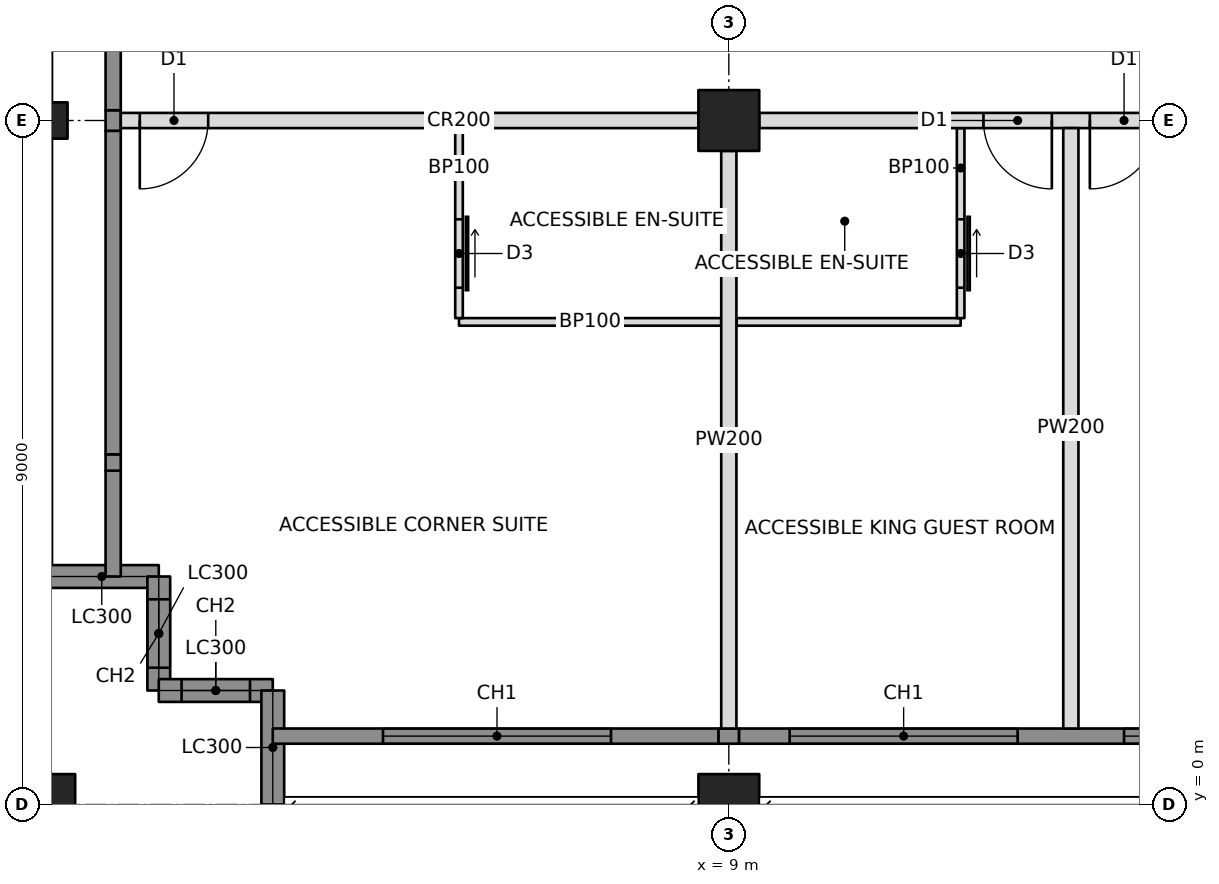
"""IFC4 building model, lengths in metres.
Left out: names, types, materials, properties, quantities, classifications, styles, units other than length and angle.
Written with IfcOpenShell. Run it as: python <this file> out.ifc"""

import sys

from ifc_helpers import new_model, si_unit, direction, frame, frame_2d, origin, origin_with_axes, origin_2d, place, context, subcontext, project, spatial, rectangle, hollow_rectangle, i_section, extrude, element, fill, save


model = new_model("IFC4")
c1 = context("Model", 3, precision=1e-05, world=origin(), true_north=direction((0.0, 1.0)))
c2 = subcontext(c1, "Body", "Model", "MODEL_VIEW")
j1 = project(units=[si_unit("LENGTHUNIT", "METRE"), si_unit("PLANEANGLEUNIT", "RADIAN")], contexts=[c1])
p1 = place(None, origin())
s1 = spatial("IfcSite", under=j1, at=p1, CompositionType="ELEMENT")
p2 = place(p1, origin())
s2 = spatial("IfcBuilding", under=s1, at=p2, CompositionType="ELEMENT")
p3 = place(p2, frame((0.0, 0.0, 51.8)))
s3 = spatial("IfcBuildingStorey", under=s2, at=p3, CompositionType="ELEMENT", Elevation=51.8)
p4 = place(p3, origin_with_axes())
e1 = element("IfcColumn", 1, at=p4, inside=s3, PredefinedType="COLUMN", context=c2, shape_type="SweptSolid", body=[
    extrude(hollow_rectangle(XDim=0.8, YDim=0.8, WallThickness=0.1, at=origin_2d()), origin(), (0.0, 0.0, 1.0), 3.4),
])
p5 = place(p3, frame((0.0, 9.0, 0.0), z_axis=(0.0, 0.0, 1.0), x_axis=(0.0, 1.0, 0.0)))
e2 = element("IfcColumn", 2, at=p5, inside=s3, PredefinedType="COLUMN", context=c2, shape_type="SweptSolid", body=[
    extrude(i_section(OverallWidth=0.478, OverallDepth=0.599, WebThickness=0.1, FlangeThickness=0.14, at=origin_2d()), origin(), (0.0, 0.0, 1.0), 3.4),
])
for number, where, z_axis, x_axis in (
    (3, (9.0, 0.0, 0.0), (0.0, 0.0, 1.0), (1.0, 0.0, 0.0)),
    (4, (9.0, 9.0, 0.0), (0.0, 0.0, 1.0), (1.0, 0.0, 0.0)),
):
    element("IfcColumn", number, at=place(p3, frame(where, z_axis=z_axis, x_axis=x_axis)), inside=s3, PredefinedType="COLUMN", context=c2, shape_type="SweptSolid", body=[
        extrude(hollow_rectangle(XDim=0.8, YDim=0.8, WallThickness=0.1, at=origin_2d()), origin(), (0.0, 0.0, 1.0), 3.4),
    ])
p6 = place(p3, frame((0.0, 3.0, 0.0), z_axis=(0.0, 0.0, 1.0), x_axis=(1.0, 0.0, 0.0)))
e5 = element("IfcWall", 5, at=p6, inside=s3, PredefinedType="SOLIDWALL", context=c2, shape_type="SweptSolid", body=[
    extrude(rectangle(XDim=1.5, YDim=0.3, at=frame_2d((0.75, 0.0))), origin(), (0.0, 0.0, 1.0), 2.42),
])
p7 = place(p3, frame((1.5, 3.0, 0.0), z_axis=(0.0, 0.0, 1.0), x_axis=(0.0, -1.0, 0.0)))
e6 = element("IfcWall", 6, at=p7, inside=s3, PredefinedType="SOLIDWALL", context=c2, shape_type="SweptSolid", body=[
    extrude(rectangle(XDim=1.5, YDim=0.3, at=frame_2d((0.75, 0.0))), origin(), (0.0, 0.0, 1.0), 3.2),
])
p8 = place(p7, frame((0.3, 0.0, 0.6)))
e7 = element("IfcOpeningElement", 7, at=p8, cuts=e6, PredefinedType="OPENING", context=c2, shape_type="SweptSolid", body=[
    extrude(rectangle(XDim=0.9, YDim=2.2, at=frame_2d((0.45, 1.1))), frame((0.0, 0.16, 0.0), z_axis=(0.0, -1.0, 0.0), x_axis=(1.0, 0.0, 0.0)), (0.0, 0.0, 1.0), 0.32),
])
p9 = place(p3, frame((1.5, 1.5, 0.0), z_axis=(0.0, 0.0, 1.0), x_axis=(1.0, 0.0, 0.0)))
e8 = element("IfcWall", 8, at=p9, inside=s3, PredefinedType="SOLIDWALL", context=c2, shape_type="SweptSolid", body=[
    extrude(rectangle(XDim=1.5, YDim=0.3, at=frame_2d((0.75, 0.0))), origin(), (0.0, 0.0, 1.0), 3.2),
])
p10 = place(p9, frame((0.3, 0.0, 0.6)))
e9 = element("IfcOpeningElement", 9, at=p10, cuts=e8, PredefinedType="OPENING", context=c2, shape_type="SweptSolid", body=[
    extrude(rectangle(XDim=0.9, YDim=2.2, at=frame_2d((0.45, 1.1))), frame((0.0, 0.16, 0.0), z_axis=(0.0, -1.0, 0.0), x_axis=(1.0, 0.0, 0.0)), (0.0, 0.0, 1.0), 0.32),
])
p11 = place(p3, frame((3.0, 1.5, 0.0), z_axis=(0.0, 0.0, 1.0), x_axis=(0.0, -1.0, 0.0)))
e10 = element("IfcWall", 10, at=p11, inside=s3, PredefinedType="SOLIDWALL", context=c2, shape_type="SweptSolid", body=[
    extrude(rectangle(XDim=1.5, YDim=0.3, at=frame_2d((0.75, 0.0))), origin(), (0.0, 0.0, 1.0), 2.42),
])
p12 = place(p3, frame((3.0, 0.9, 0.0), z_axis=(0.0, 0.0, 1.0), x_axis=(1.0, 0.0, 0.0)))
e11 = element("IfcWall", 11, at=p12, inside=s3, PredefinedType="SOLIDWALL", context=c2, shape_type="SweptSolid", body=[
    extrude(rectangle(XDim=5.865, YDim=0.2, at=frame_2d((2.932, 0.0))), origin(), (0.0, 0.0, 1.0), 3.2),
])
p13 = place(p12, frame((1.45, 0.0, 0.6)))
e12 = element("IfcOpeningElement", 12, at=p13, cuts=e11, PredefinedType="OPENING", context=c2, shape_type="SweptSolid", body=[
    extrude(rectangle(XDim=3.0, YDim=2.2, at=frame_2d((1.5, 1.1))), frame((0.0, 0.11, 0.0), z_axis=(0.0, -1.0, 0.0), x_axis=(1.0, 0.0, 0.0)), (0.0, 0.0, 1.0), 0.22),
])
p14 = place(p3, frame((0.9, 3.0, 0.0), z_axis=(0.0, 0.0, 1.0), x_axis=(0.0, 1.0, 0.0)))
e13 = element("IfcWall", 13, at=p14, inside=s3, PredefinedType="SOLIDWALL", context=c2, shape_type="SweptSolid", body=[
    extrude(rectangle(XDim=1.393, YDim=0.2, at=frame_2d((0.696, 0.0))), origin(), (0.0, 0.0, 1.0), 3.2),
])
p15 = place(p3, frame((1.0, 9.0, 0.0), z_axis=(0.0, 0.0, 1.0), x_axis=(1.0, 0.0, 0.0)))
e14 = element("IfcWall", 14, at=p15, inside=s3, PredefinedType="PARTITIONING", context=c2, shape_type="SweptSolid", body=[
    extrude(rectangle(XDim=7.6, YDim=0.2, at=frame_2d((3.8, 0.0))), origin(), (0.0, 0.0, 1.0), 2.438),
])
p16 = place(p15, frame((0.25, 0.0, 0.0)))
e15 = element("IfcOpeningElement", 15, at=p16, cuts=e14, PredefinedType="OPENING", context=c2, shape_type="SweptSolid", body=[
    extrude(rectangle(XDim=0.9, YDim=2.1, at=frame_2d((0.45, 1.05))), frame((0.0, 0.11, 0.0), z_axis=(0.0, -1.0, 0.0), x_axis=(1.0, 0.0, 0.0)), (0.0, 0.0, 1.0), 0.22),
])
p17 = place(p3, frame((9.4, 9.0, 0.0), z_axis=(0.0, 0.0, 1.0), x_axis=(1.0, 0.0, 0.0)))
e16 = element("IfcWall", 16, at=p17, inside=s3, PredefinedType="PARTITIONING", context=c2, shape_type="SweptSolid", body=[
    extrude(rectangle(XDim=8.2, YDim=0.2, at=frame_2d((4.1, 0.0))), origin(), (0.0, 0.0, 1.0), 2.405),
])
p18 = place(p17, frame((2.95, 0.0, 0.0)))
e17 = element("IfcOpeningElement", 17, at=p18, cuts=e16, PredefinedType="OPENING", context=c2, shape_type="SweptSolid", body=[
    extrude(rectangle(XDim=0.9, YDim=2.1, at=frame_2d((0.45, 1.05))), frame((0.0, 0.11, 0.0), z_axis=(0.0, -1.0, 0.0), x_axis=(1.0, 0.0, 0.0)), (0.0, 0.0, 1.0), 0.22),
])
p19 = place(p17, frame((4.35, 0.0, 0.0)))
e18 = element("IfcOpeningElement", 18, at=p19, cuts=e16, PredefinedType="OPENING", context=c2, shape_type="SweptSolid", body=[
    extrude(rectangle(XDim=0.9, YDim=2.1, at=frame_2d((0.45, 1.05))), frame((0.0, 0.11, 0.0), z_axis=(0.0, -1.0, 0.0), x_axis=(1.0, 0.0, 0.0)), (0.0, 0.0, 1.0), 0.22),
])
p20 = place(p3, frame((9.0, 8.6, 0.0), z_axis=(0.0, 0.0, 1.0), x_axis=(0.0, -1.0, 0.0)))
e19 = element("IfcWall", 19, at=p20, inside=s3, PredefinedType="PARTITIONING", context=c2, shape_type="SweptSolid", body=[
    extrude(rectangle(XDim=7.6, YDim=0.2, at=frame_2d((3.8, 0.0))), origin(), (0.0, 0.0, 1.0), 2.438),
])
p21 = place(p3, frame((13.5, 8.9, 0.0), z_axis=(0.0, 0.0, 1.0), x_axis=(0.0, -1.0, 0.0)))
e20 = element("IfcWall", 20, at=p21, inside=s3, PredefinedType="PARTITIONING", context=c2, shape_type="SweptSolid", body=[
    extrude(rectangle(XDim=7.9, YDim=0.2, at=frame_2d((3.95, 0.0))), origin(), (0.0, 0.0, 1.0), 2.404),
])
p22 = place(p3, frame((5.45, 6.35, 0.0), z_axis=(0.0, 0.0, 1.0), x_axis=(1.0, 0.0, 0.0)))
e21 = element("IfcWall", 21, at=p22, inside=s3, PredefinedType="PARTITIONING", context=c2, shape_type="SweptSolid", body=[
    extrude(rectangle(XDim=3.45, YDim=0.1, at=frame_2d((1.725, 0.0))), origin(), (0.0, 0.0, 1.0), 2.438),
])
p23 = place(p3, frame((5.45, 8.9, 0.0), z_axis=(0.0, 0.0, 1.0), x_axis=(0.0, -1.0, 0.0)))
e22 = element("IfcWall", 22, at=p23, inside=s3, PredefinedType="PARTITIONING", context=c2, shape_type="SweptSolid", body=[
    extrude(rectangle(XDim=2.5, YDim=0.1, at=frame_2d((1.25, 0.0))), origin(), (0.0, 0.0, 1.0), 2.438),
])
p24 = place(p23, frame((1.2, 0.0, 0.0)))
e23 = element("IfcOpeningElement", 23, at=p24, cuts=e22, PredefinedType="OPENING", context=c2, shape_type="SweptSolid", body=[
    extrude(rectangle(XDim=0.9, YDim=2.1, at=frame_2d((0.45, 1.05))), frame((0.0, 0.06, 0.0), z_axis=(0.0, -1.0, 0.0), x_axis=(1.0, 0.0, 0.0)), (0.0, 0.0, 1.0), 0.12),
])
p25 = place(p3, frame((9.1, 6.35, 0.0), z_axis=(0.0, 0.0, 1.0), x_axis=(1.0, 0.0, 0.0)))
e24 = element("IfcWall", 24, at=p25, inside=s3, PredefinedType="PARTITIONING", context=c2, shape_type="SweptSolid", body=[
    extrude(rectangle(XDim=2.95, YDim=0.1, at=frame_2d((1.475, 0.0))), origin(), (0.0, 0.0, 1.0), 2.438),
])
p26 = place(p3, frame((12.05, 8.9, 0.0), z_axis=(0.0, 0.0, 1.0), x_axis=(0.0, -1.0, 0.0)))
e25 = element("IfcWall", 25, at=p26, inside=s3, PredefinedType="PARTITIONING", context=c2, shape_type="SweptSolid", body=[
    extrude(rectangle(XDim=2.5, YDim=0.1, at=frame_2d((1.25, 0.0))), origin(), (0.0, 0.0, 1.0), 2.404),
])
p27 = place(p26, frame((1.2, 0.0, 0.0)))
e26 = element("IfcOpeningElement", 26, at=p27, cuts=e25, PredefinedType="OPENING", context=c2, shape_type="SweptSolid", body=[
    extrude(rectangle(XDim=0.9, YDim=2.1, at=frame_2d((0.45, 1.05))), frame((0.0, 0.06, 0.0), z_axis=(0.0, -1.0, 0.0), x_axis=(1.0, 0.0, 0.0)), (0.0, 0.0, 1.0), 0.12),
])
p28 = place(p3, frame((8.865, 0.9, 0.0), z_axis=(0.0, 0.0, 1.0), x_axis=(1.0, 0.0, 0.0)))
e27 = element("IfcWall", 27, at=p28, inside=s3, PredefinedType="SOLIDWALL", context=c2, shape_type="SweptSolid", body=[
    extrude(rectangle(XDim=0.271, YDim=0.2, at=frame_2d((0.135, 0.0))), origin(), (0.0, 0.0, 1.0), 2.438),
])
p29 = place(p3, frame((9.135, 0.9, 0.0), z_axis=(0.0, 0.0, 1.0), x_axis=(1.0, 0.0, 0.0)))
e28 = element("IfcWall", 28, at=p29, inside=s3, PredefinedType="SOLIDWALL", context=c2, shape_type="SweptSolid", body=[
    extrude(rectangle(XDim=8.671, YDim=0.2, at=frame_2d((4.335, 0.0))), origin(), (0.0, 0.0, 1.0), 3.2),
])
p30 = place(p29, frame((0.665, 0.0, 0.6)))
e29 = element("IfcOpeningElement", 29, at=p30, cuts=e28, PredefinedType="OPENING", context=c2, shape_type="SweptSolid", body=[
    extrude(rectangle(XDim=3.0, YDim=2.2, at=frame_2d((1.5, 1.1))), frame((0.0, 0.11, 0.0), z_axis=(0.0, -1.0, 0.0), x_axis=(1.0, 0.0, 0.0)), (0.0, 0.0, 1.0), 0.22),
])
p31 = place(p29, frame((5.065, 0.0, 0.6)))
e30 = element("IfcOpeningElement", 30, at=p31, cuts=e28, PredefinedType="OPENING", context=c2, shape_type="SweptSolid", body=[
    extrude(rectangle(XDim=3.0, YDim=2.2, at=frame_2d((1.5, 1.1))), frame((0.0, 0.11, 0.0), z_axis=(0.0, -1.0, 0.0), x_axis=(1.0, 0.0, 0.0)), (0.0, 0.0, 1.0), 0.22),
])
p32 = place(p3, frame((0.9, 4.393, 0.0), z_axis=(0.0, 0.0, 1.0), x_axis=(0.0, 1.0, 0.0)))
e31 = element("IfcWall", 31, at=p32, inside=s3, PredefinedType="SOLIDWALL", context=c2, shape_type="SweptSolid", body=[
    extrude(rectangle(XDim=0.215, YDim=0.2, at=frame_2d((0.107, 0.0))), origin(), (0.0, 0.0, 1.0), 2.661),
])
p33 = place(p3, frame((0.9, 4.607, 0.0), z_axis=(0.0, 0.0, 1.0), x_axis=(0.0, 1.0, 0.0)))
e32 = element("IfcWall", 32, at=p33, inside=s3, PredefinedType="SOLIDWALL", context=c2, shape_type="SweptSolid", body=[
    extrude(rectangle(XDim=4.257, YDim=0.2, at=frame_2d((2.129, 0.0))), origin(), (0.0, 0.0, 1.0), 3.2),
])
p34 = place(p3, frame((0.9, 8.865, 0.0), z_axis=(0.0, 0.0, 1.0), x_axis=(0.0, 1.0, 0.0)))
e33 = element("IfcWall", 33, at=p34, inside=s3, PredefinedType="SOLIDWALL", context=c2, shape_type="SweptSolid", body=[
    extrude(rectangle(XDim=0.271, YDim=0.2, at=frame_2d((0.135, 0.0))), origin(), (0.0, 0.0, 1.0), 2.438),
])
p35 = place(p3, frame((0.9, 9.135, 0.0), z_axis=(0.0, 0.0, 1.0), x_axis=(0.0, 1.0, 0.0)))
e34 = element("IfcWall", 34, at=p35, inside=s3, PredefinedType="SOLIDWALL", context=c2, shape_type="SweptSolid", body=[
    extrude(rectangle(XDim=8.671, YDim=0.2, at=frame_2d((4.335, 0.0))), origin(), (0.0, 0.0, 1.0), 3.2),
])
p36 = place(p35, frame((2.015, 0.0, 0.6)))
e35 = element("IfcOpeningElement", 35, at=p36, cuts=e34, PredefinedType="OPENING", context=c2, shape_type="SweptSolid", body=[
    extrude(rectangle(XDim=3.0, YDim=2.2, at=frame_2d((1.5, 1.1))), frame((0.0, 0.11, 0.0), z_axis=(0.0, -1.0, 0.0), x_axis=(1.0, 0.0, 0.0)), (0.0, 0.0, 1.0), 0.22),
])
p37 = place(p35, frame((5.515, 0.0, 0.6)))
e36 = element("IfcOpeningElement", 36, at=p37, cuts=e34, PredefinedType="OPENING", context=c2, shape_type="SweptSolid", body=[
    extrude(rectangle(XDim=3.0, YDim=2.2, at=frame_2d((1.5, 1.1))), frame((0.0, 0.11, 0.0), z_axis=(0.0, -1.0, 0.0), x_axis=(1.0, 0.0, 0.0)), (0.0, 0.0, 1.0), 0.22),
])
p38 = place(p8, origin())
e37 = element("IfcWindow", 37, at=p38, inside=s3, PartitioningType="SINGLE_PANEL", PredefinedType="WINDOW", context=c2, shape_type="SweptSolid", body=[
    extrude(rectangle(XDim=0.9, YDim=2.2, at=frame_2d((0.45, 1.1))), frame((0.0, 0.03, 0.0), z_axis=(0.0, -1.0, 0.0), x_axis=(1.0, 0.0, 0.0)), (0.0, 0.0, 1.0), 0.06),
])
fill(e7, e37)
p39 = place(p10, origin())
e38 = element("IfcWindow", 38, at=p39, inside=s3, PartitioningType="SINGLE_PANEL", PredefinedType="WINDOW", context=c2, shape_type="SweptSolid", body=[
    extrude(rectangle(XDim=0.9, YDim=2.2, at=frame_2d((0.45, 1.1))), frame((0.0, 0.03, 0.0), z_axis=(0.0, -1.0, 0.0), x_axis=(1.0, 0.0, 0.0)), (0.0, 0.0, 1.0), 0.06),
])
fill(e9, e38)
p40 = place(p13, origin())
e39 = element("IfcWindow", 39, at=p40, inside=s3, PartitioningType="TRIPLE_PANEL_VERTICAL", PredefinedType="WINDOW", context=c2, shape_type="SweptSolid", body=[
    extrude(rectangle(XDim=3.0, YDim=2.2, at=frame_2d((1.5, 1.1))), frame((0.0, 0.03, 0.0), z_axis=(0.0, -1.0, 0.0), x_axis=(1.0, 0.0, 0.0)), (0.0, 0.0, 1.0), 0.06),
])
fill(e12, e39)
p41 = place(p30, origin())
e40 = element("IfcWindow", 40, at=p41, inside=s3, PartitioningType="TRIPLE_PANEL_VERTICAL", PredefinedType="WINDOW", context=c2, shape_type="SweptSolid", body=[
    extrude(rectangle(XDim=3.0, YDim=2.2, at=frame_2d((1.5, 1.1))), frame((0.0, 0.03, 0.0), z_axis=(0.0, -1.0, 0.0), x_axis=(1.0, 0.0, 0.0)), (0.0, 0.0, 1.0), 0.06),
])
fill(e29, e40)
p42 = place(p31, origin())
e41 = element("IfcWindow", 41, at=p42, inside=s3, PartitioningType="TRIPLE_PANEL_VERTICAL", PredefinedType="WINDOW", context=c2, shape_type="SweptSolid", body=[
    extrude(rectangle(XDim=3.0, YDim=2.2, at=frame_2d((1.5, 1.1))), frame((0.0, 0.03, 0.0), z_axis=(0.0, -1.0, 0.0), x_axis=(1.0, 0.0, 0.0)), (0.0, 0.0, 1.0), 0.06),
])
fill(e30, e41)
p43 = place(p24, origin())
e42 = element("IfcDoor", 42, at=p43, inside=s3, OperationType="SLIDING_TO_LEFT", PredefinedType="DOOR", context=c2, shape_type="SweptSolid", body=[
    extrude(rectangle(XDim=0.9, YDim=2.1, at=frame_2d((0.45, 1.05))), frame((0.0, 0.025, 0.0), z_axis=(0.0, -1.0, 0.0), x_axis=(1.0, 0.0, 0.0)), (0.0, 0.0, 1.0), 0.05),
])
fill(e23, e42)
p44 = place(p16, frame((0.9, 0.0, 0.0), z_axis=(0.0, 0.0, 1.0), x_axis=(-1.0, 0.0, 0.0)))
e43 = element("IfcDoor", 43, at=p44, inside=s3, OperationType="SINGLE_SWING_RIGHT", PredefinedType="DOOR", context=c2, shape_type="SweptSolid", body=[
    extrude(rectangle(XDim=0.9, YDim=2.1, at=frame_2d((0.45, 1.05))), frame((0.0, 0.025, 0.0), z_axis=(0.0, -1.0, 0.0), x_axis=(1.0, 0.0, 0.0)), (0.0, 0.0, 1.0), 0.05),
])
fill(e15, e43)
p45 = place(p27, origin())
e44 = element("IfcDoor", 44, at=p45, inside=s3, OperationType="SLIDING_TO_LEFT", PredefinedType="DOOR", context=c2, shape_type="SweptSolid", body=[
    extrude(rectangle(XDim=0.9, YDim=2.1, at=frame_2d((0.45, 1.05))), frame((0.0, 0.025, 0.0), z_axis=(0.0, -1.0, 0.0), x_axis=(1.0, 0.0, 0.0)), (0.0, 0.0, 1.0), 0.05),
])
fill(e26, e44)
p46 = place(p18, frame((0.9, 0.0, 0.0), z_axis=(0.0, 0.0, 1.0), x_axis=(-1.0, 0.0, 0.0)))
e45 = element("IfcDoor", 45, at=p46, inside=s3, OperationType="SINGLE_SWING_LEFT", PredefinedType="DOOR", context=c2, shape_type="SweptSolid", body=[
    extrude(rectangle(XDim=0.9, YDim=2.1, at=frame_2d((0.45, 1.05))), frame((0.0, 0.025, 0.0), z_axis=(0.0, -1.0, 0.0), x_axis=(1.0, 0.0, 0.0)), (0.0, 0.0, 1.0), 0.05),
])
fill(e17, e45)
p47 = place(p19, frame((0.9, 0.0, 0.0), z_axis=(0.0, 0.0, 1.0), x_axis=(-1.0, 0.0, 0.0)))
e46 = element("IfcDoor", 46, at=p47, inside=s3, OperationType="SINGLE_SWING_RIGHT", PredefinedType="DOOR", context=c2, shape_type="SweptSolid", body=[
    extrude(rectangle(XDim=0.9, YDim=2.1, at=frame_2d((0.45, 1.05))), frame((0.0, 0.025, 0.0), z_axis=(0.0, -1.0, 0.0), x_axis=(1.0, 0.0, 0.0)), (0.0, 0.0, 1.0), 0.05),
])
fill(e18, e46)
save(model, sys.argv[1])
